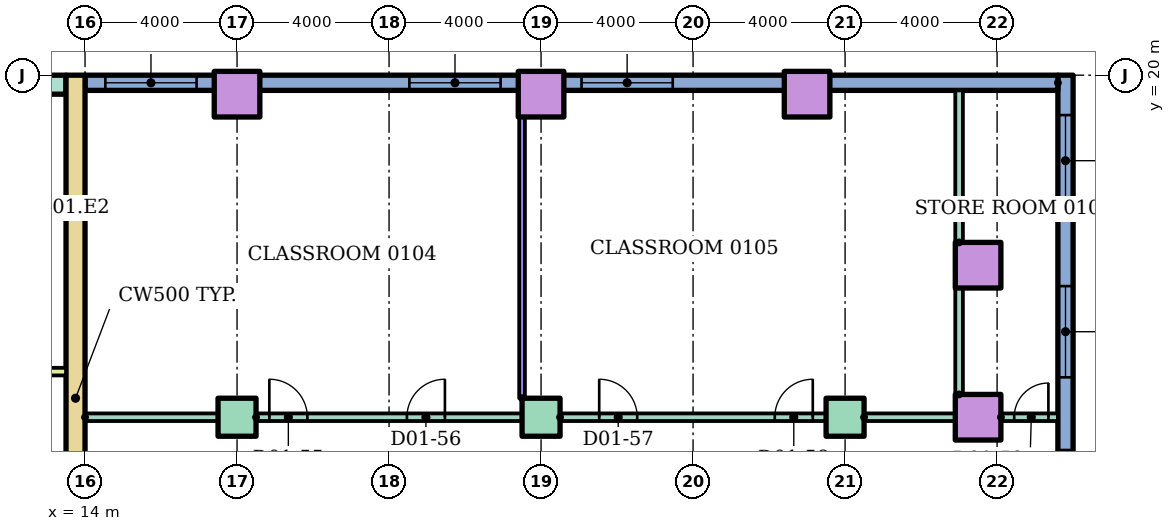
"""IFC4 building model, lengths in metres.
Left out: names, types, materials, properties, quantities, classifications, styles, units other than length and angle.
Written with IfcOpenShell. Run it as: python <this file> out.ifc"""

import sys

from ifc_helpers import new_model, si_unit, direction, frame, frame_2d, origin, origin_2d, place, context, subcontext, project, spatial, rectangle, hollow_rectangle, extrude, element, fill, save


model = new_model("IFC4")
c1 = context("Model", 3, precision=1e-05, world=origin(), true_north=direction((0.0, 1.0)))
c2 = subcontext(c1, "Body", "Model", "MODEL_VIEW")
j1 = project(units=[si_unit("LENGTHUNIT", "METRE"), si_unit("PLANEANGLEUNIT", "RADIAN")], contexts=[c1])
p1 = place(None, origin())
s1 = spatial("IfcSite", under=j1, at=p1, CompositionType="ELEMENT")
p2 = place(p1, origin())
s2 = spatial("IfcBuilding", under=s1, at=p2, CompositionType="ELEMENT")
p3 = place(p2, frame((0.0, 0.0, 6.0)))
s3 = spatial("IfcBuildingStorey", under=s2, at=p3, CompositionType="ELEMENT", Elevation=6.0)
for number, where in (
    (1, (18.0, 11.0, 0.0)),
    (2, (26.0, 11.0, 0.0)),
    (3, (34.0, 11.0, 0.0)),
):
    element("IfcColumn", number, at=place(p3, frame(where)), inside=s3, PredefinedType="COLUMN", context=c2, shape_type="SweptSolid", body=[
        extrude(rectangle(XDim=1.0, YDim=1.0, at=origin_2d()), origin(), (0.0, 0.0, 1.0), 4.0),
    ])
for number, where in (
    (4, (37.5, 11.0, 0.0)),
    (5, (37.5, 15.0, 0.0)),
    (6, (18.0, 19.5, 0.0)),
    (7, (26.0, 19.5, 0.0)),
    (8, (33.0, 19.5, 0.0)),
):
    element("IfcColumn", number, at=place(p3, frame(where)), inside=s3, PredefinedType="COLUMN", context=c2, shape_type="SweptSolid", body=[
        extrude(hollow_rectangle(XDim=1.2, YDim=1.2, WallThickness=0.06, at=origin_2d()), origin(), (0.0, 0.0, 1.0), 4.0),
    ])
p4 = place(p3, frame((39.8, -50.0, 0.0), z_axis=(0.0, 0.0, 1.0), x_axis=(0.0, 1.0, 0.0)))
e9 = element("IfcWall", 9, at=p4, inside=s3, PredefinedType="STANDARD", context=c2, shape_type="SweptSolid", body=[
    extrude(rectangle(XDim=70.0, YDim=0.4, at=frame_2d((35.0, 0.0))), origin(), (0.0, 0.0, 1.0), 3.7),
])
p5 = place(p4, frame((0.75, 0.0, 0.9)))
e10 = element("IfcOpeningElement", 10, at=p5, cuts=e9, PredefinedType="OPENING", context=c2, shape_type="SweptSolid", body=[
    extrude(rectangle(XDim=2.4, YDim=2.1, at=frame_2d((1.2, 1.05))), frame((0.0, 0.21, 0.0), z_axis=(0.0, -1.0, 0.0), x_axis=(1.0, 0.0, 0.0)), (0.0, 0.0, 1.0), 0.42),
])
p6 = place(p4, frame((6.633, 0.0, 0.9)))
e11 = element("IfcOpeningElement", 11, at=p6, cuts=e9, PredefinedType="OPENING", context=c2, shape_type="SweptSolid", body=[
    extrude(rectangle(XDim=2.4, YDim=2.1, at=frame_2d((1.2, 1.05))), frame((0.0, 0.21, 0.0), z_axis=(0.0, -1.0, 0.0), x_axis=(1.0, 0.0, 0.0)), (0.0, 0.0, 1.0), 0.42),
])
p7 = place(p4, frame((10.3, 0.0, 0.9)))
e12 = element("IfcOpeningElement", 12, at=p7, cuts=e9, PredefinedType="OPENING", context=c2, shape_type="SweptSolid", body=[
    extrude(rectangle(XDim=2.4, YDim=2.1, at=frame_2d((1.2, 1.05))), frame((0.0, 0.21, 0.0), z_axis=(0.0, -1.0, 0.0), x_axis=(1.0, 0.0, 0.0)), (0.0, 0.0, 1.0), 0.42),
])
p8 = place(p4, frame((13.967, 0.0, 0.9)))
e13 = element("IfcOpeningElement", 13, at=p8, cuts=e9, PredefinedType="OPENING", context=c2, shape_type="SweptSolid", body=[
    extrude(rectangle(XDim=2.4, YDim=2.1, at=frame_2d((1.2, 1.05))), frame((0.0, 0.21, 0.0), z_axis=(0.0, -1.0, 0.0), x_axis=(1.0, 0.0, 0.0)), (0.0, 0.0, 1.0), 0.42),
])
p9 = place(p4, frame((28.863, 0.0, 0.9)))
e14 = element("IfcOpeningElement", 14, at=p9, cuts=e9, PredefinedType="OPENING", context=c2, shape_type="SweptSolid", body=[
    extrude(rectangle(XDim=2.4, YDim=2.1, at=frame_2d((1.2, 1.05))), frame((0.0, 0.21, 0.0), z_axis=(0.0, -1.0, 0.0), x_axis=(1.0, 0.0, 0.0)), (0.0, 0.0, 1.0), 0.42),
])
p10 = place(p4, frame((32.988, 0.0, 0.9)))
e15 = element("IfcOpeningElement", 15, at=p10, cuts=e9, PredefinedType="OPENING", context=c2, shape_type="SweptSolid", body=[
    extrude(rectangle(XDim=2.4, YDim=2.1, at=frame_2d((1.2, 1.05))), frame((0.0, 0.21, 0.0), z_axis=(0.0, -1.0, 0.0), x_axis=(1.0, 0.0, 0.0)), (0.0, 0.0, 1.0), 0.42),
])
p11 = place(p4, frame((37.113, 0.0, 0.9)))
e16 = element("IfcOpeningElement", 16, at=p11, cuts=e9, PredefinedType="OPENING", context=c2, shape_type="SweptSolid", body=[
    extrude(rectangle(XDim=2.4, YDim=2.1, at=frame_2d((1.2, 1.05))), frame((0.0, 0.21, 0.0), z_axis=(0.0, -1.0, 0.0), x_axis=(1.0, 0.0, 0.0)), (0.0, 0.0, 1.0), 0.42),
])
p12 = place(p4, frame((41.238, 0.0, 0.9)))
e17 = element("IfcOpeningElement", 17, at=p12, cuts=e9, PredefinedType="OPENING", context=c2, shape_type="SweptSolid", body=[
    extrude(rectangle(XDim=2.4, YDim=2.1, at=frame_2d((1.2, 1.05))), frame((0.0, 0.21, 0.0), z_axis=(0.0, -1.0, 0.0), x_axis=(1.0, 0.0, 0.0)), (0.0, 0.0, 1.0), 0.42),
])
p13 = place(p4, frame((45.363, 0.0, 0.9)))
e18 = element("IfcOpeningElement", 18, at=p13, cuts=e9, PredefinedType="OPENING", context=c2, shape_type="SweptSolid", body=[
    extrude(rectangle(XDim=2.4, YDim=2.1, at=frame_2d((1.2, 1.05))), frame((0.0, 0.21, 0.0), z_axis=(0.0, -1.0, 0.0), x_axis=(1.0, 0.0, 0.0)), (0.0, 0.0, 1.0), 0.42),
])
p14 = place(p4, frame((49.488, 0.0, 0.9)))
e19 = element("IfcOpeningElement", 19, at=p14, cuts=e9, PredefinedType="OPENING", context=c2, shape_type="SweptSolid", body=[
    extrude(rectangle(XDim=2.4, YDim=2.1, at=frame_2d((1.2, 1.05))), frame((0.0, 0.21, 0.0), z_axis=(0.0, -1.0, 0.0), x_axis=(1.0, 0.0, 0.0)), (0.0, 0.0, 1.0), 0.42),
])
p15 = place(p4, frame((53.613, 0.0, 0.9)))
e20 = element("IfcOpeningElement", 20, at=p15, cuts=e9, PredefinedType="OPENING", context=c2, shape_type="SweptSolid", body=[
    extrude(rectangle(XDim=2.4, YDim=2.1, at=frame_2d((1.2, 1.05))), frame((0.0, 0.21, 0.0), z_axis=(0.0, -1.0, 0.0), x_axis=(1.0, 0.0, 0.0)), (0.0, 0.0, 1.0), 0.42),
])
p16 = place(p4, frame((57.738, 0.0, 0.9)))
e21 = element("IfcOpeningElement", 21, at=p16, cuts=e9, PredefinedType="OPENING", context=c2, shape_type="SweptSolid", body=[
    extrude(rectangle(XDim=2.4, YDim=2.1, at=frame_2d((1.2, 1.05))), frame((0.0, 0.21, 0.0), z_axis=(0.0, -1.0, 0.0), x_axis=(1.0, 0.0, 0.0)), (0.0, 0.0, 1.0), 0.42),
])
p17 = place(p4, frame((62.05, 0.0, 0.9)))
e22 = element("IfcOpeningElement", 22, at=p17, cuts=e9, PredefinedType="OPENING", context=c2, shape_type="SweptSolid", body=[
    extrude(rectangle(XDim=2.4, YDim=2.1, at=frame_2d((1.2, 1.05))), frame((0.0, 0.21, 0.0), z_axis=(0.0, -1.0, 0.0), x_axis=(1.0, 0.0, 0.0)), (0.0, 0.0, 1.0), 0.42),
])
p18 = place(p4, frame((66.55, 0.0, 0.9)))
e23 = element("IfcOpeningElement", 23, at=p18, cuts=e9, PredefinedType="OPENING", context=c2, shape_type="SweptSolid", body=[
    extrude(rectangle(XDim=2.4, YDim=2.1, at=frame_2d((1.2, 1.05))), frame((0.0, 0.21, 0.0), z_axis=(0.0, -1.0, 0.0), x_axis=(1.0, 0.0, 0.0)), (0.0, 0.0, 1.0), 0.42),
])
p19 = place(p3, frame((39.6, 19.8, 0.0), z_axis=(0.0, 0.0, 1.0), x_axis=(-1.0, 0.0, 0.0)))
e24 = element("IfcWall", 24, at=p19, inside=s3, PredefinedType="STANDARD", context=c2, shape_type="SweptSolid", body=[
    extrude(rectangle(XDim=25.6, YDim=0.4, at=frame_2d((12.8, 0.0))), origin(), (0.0, 0.0, 1.0), 3.7),
])
p20 = place(p19, frame((10.135, 0.0, 0.9)))
e25 = element("IfcOpeningElement", 25, at=p20, cuts=e24, PredefinedType="OPENING", context=c2, shape_type="SweptSolid", body=[
    extrude(rectangle(XDim=2.4, YDim=2.1, at=frame_2d((1.2, 1.05))), frame((0.0, 0.21, 0.0), z_axis=(0.0, -1.0, 0.0), x_axis=(1.0, 0.0, 0.0)), (0.0, 0.0, 1.0), 0.42),
])
p21 = place(p19, frame((14.665, 0.0, 0.9)))
e26 = element("IfcOpeningElement", 26, at=p21, cuts=e24, PredefinedType="OPENING", context=c2, shape_type="SweptSolid", body=[
    extrude(rectangle(XDim=2.4, YDim=2.1, at=frame_2d((1.2, 1.05))), frame((0.0, 0.21, 0.0), z_axis=(0.0, -1.0, 0.0), x_axis=(1.0, 0.0, 0.0)), (0.0, 0.0, 1.0), 0.42),
])
p22 = place(p19, frame((22.665, 0.0, 0.9)))
e27 = element("IfcOpeningElement", 27, at=p22, cuts=e24, PredefinedType="OPENING", context=c2, shape_type="SweptSolid", body=[
    extrude(rectangle(XDim=2.4, YDim=2.1, at=frame_2d((1.2, 1.05))), frame((0.0, 0.21, 0.0), z_axis=(0.0, -1.0, 0.0), x_axis=(1.0, 0.0, 0.0)), (0.0, 0.0, 1.0), 0.42),
])
p23 = place(p3, frame((13.75, 3.0, 0.0), z_axis=(0.0, 0.0, 1.0), x_axis=(0.0, 1.0, 0.0)))
e28 = element("IfcWall", 28, at=p23, inside=s3, PredefinedType="SHEAR", context=c2, shape_type="SweptSolid", body=[
    extrude(rectangle(XDim=17.0, YDim=0.5, at=frame_2d((8.5, 0.0))), origin(), (0.0, 0.0, 1.0), 3.7),
])
p24 = place(p3, frame((-13.5, 19.75, 0.0)))
e29 = element("IfcWall", 29, at=p24, inside=s3, PredefinedType="SHEAR", context=c2, shape_type="SweptSolid", body=[
    extrude(rectangle(XDim=27.0, YDim=0.5, at=frame_2d((13.5, 0.0))), origin(), (0.0, 0.0, 1.0), 3.7),
])
p25 = place(p3, frame((9.6, 12.2, 0.0)))
e30 = element("IfcWall", 30, at=p25, inside=s3, PredefinedType="PARTITIONING", context=c2, shape_type="SweptSolid", body=[
    extrude(rectangle(XDim=3.9, YDim=0.2, at=frame_2d((1.95, 0.0))), origin(), (0.0, 0.0, 1.0), 3.7),
])
p26 = place(p3, frame((14.0, 11.0, 0.0)))
e31 = element("IfcWall", 31, at=p26, inside=s3, PredefinedType="PARTITIONING", context=c2, shape_type="SweptSolid", body=[
    extrude(rectangle(XDim=3.5, YDim=0.2, at=frame_2d((1.75, 0.0))), origin(), (0.0, 0.0, 1.0), 3.7),
])
p27 = place(p3, frame((18.5, 11.0, 0.0)))
e32 = element("IfcWall", 32, at=p27, inside=s3, PredefinedType="PARTITIONING", context=c2, shape_type="SweptSolid", body=[
    extrude(rectangle(XDim=7.0, YDim=0.2, at=frame_2d((3.5, 0.0))), origin(), (0.0, 0.0, 1.0), 3.7),
])
p28 = place(p27, frame((0.35, 0.0, 0.0)))
e33 = element("IfcOpeningElement", 33, at=p28, cuts=e32, PredefinedType="OPENING", context=c2, shape_type="SweptSolid", body=[
    extrude(rectangle(XDim=1.0, YDim=2.1, at=frame_2d((0.5, 1.05))), frame((0.0, 0.11, 0.0), z_axis=(0.0, -1.0, 0.0), x_axis=(1.0, 0.0, 0.0)), (0.0, 0.0, 1.0), 0.22),
])
p29 = place(p27, frame((3.97, 0.0, 0.0)))
e34 = element("IfcOpeningElement", 34, at=p29, cuts=e32, PredefinedType="OPENING", context=c2, shape_type="SweptSolid", body=[
    extrude(rectangle(XDim=1.0, YDim=2.1, at=frame_2d((0.5, 1.05))), frame((0.0, 0.11, 0.0), z_axis=(0.0, -1.0, 0.0), x_axis=(1.0, 0.0, 0.0)), (0.0, 0.0, 1.0), 0.22),
])
p30 = place(p3, frame((26.5, 11.0, 0.0)))
e35 = element("IfcWall", 35, at=p30, inside=s3, PredefinedType="PARTITIONING", context=c2, shape_type="SweptSolid", body=[
    extrude(rectangle(XDim=7.0, YDim=0.2, at=frame_2d((3.5, 0.0))), origin(), (0.0, 0.0, 1.0), 3.7),
])
p31 = place(p30, frame((1.03, 0.0, 0.0)))
e36 = element("IfcOpeningElement", 36, at=p31, cuts=e35, PredefinedType="OPENING", context=c2, shape_type="SweptSolid", body=[
    extrude(rectangle(XDim=1.0, YDim=2.1, at=frame_2d((0.5, 1.05))), frame((0.0, 0.11, 0.0), z_axis=(0.0, -1.0, 0.0), x_axis=(1.0, 0.0, 0.0)), (0.0, 0.0, 1.0), 0.22),
])
p32 = place(p30, frame((5.65, 0.0, 0.0)))
e37 = element("IfcOpeningElement", 37, at=p32, cuts=e35, PredefinedType="OPENING", context=c2, shape_type="SweptSolid", body=[
    extrude(rectangle(XDim=1.0, YDim=2.1, at=frame_2d((0.5, 1.05))), frame((0.0, 0.11, 0.0), z_axis=(0.0, -1.0, 0.0), x_axis=(1.0, 0.0, 0.0)), (0.0, 0.0, 1.0), 0.22),
])
p33 = place(p3, frame((34.5, 11.0, 0.0)))
e38 = element("IfcWall", 38, at=p33, inside=s3, PredefinedType="PARTITIONING", context=c2, shape_type="SweptSolid", body=[
    extrude(rectangle(XDim=2.4, YDim=0.2, at=frame_2d((1.2, 0.0))), origin(), (0.0, 0.0, 1.0), 3.7),
])
p34 = place(p3, frame((38.1, 11.0, 0.0)))
e39 = element("IfcWall", 39, at=p34, inside=s3, PredefinedType="PARTITIONING", context=c2, shape_type="SweptSolid", body=[
    extrude(rectangle(XDim=1.5, YDim=0.2, at=frame_2d((0.75, 0.0))), origin(), (0.0, 0.0, 1.0), 3.7),
])
p35 = place(p34, frame((0.35, 0.0, 0.0)))
e40 = element("IfcOpeningElement", 40, at=p35, cuts=e39, PredefinedType="OPENING", context=c2, shape_type="SweptSolid", body=[
    extrude(rectangle(XDim=0.9, YDim=2.1, at=frame_2d((0.45, 1.05))), frame((0.0, 0.11, 0.0), z_axis=(0.0, -1.0, 0.0), x_axis=(1.0, 0.0, 0.0)), (0.0, 0.0, 1.0), 0.22),
])
p36 = place(p3, frame((25.5, 11.5, 0.0), z_axis=(0.0, 0.0, 1.0), x_axis=(0.0, 1.0, 0.0)))
e41 = element("IfcWall", 41, at=p36, inside=s3, PredefinedType="PARTITIONING", context=c2, shape_type="SweptSolid", body=[
    extrude(rectangle(XDim=7.4, YDim=0.15, at=frame_2d((3.7, 0.0))), origin(), (0.0, 0.0, 1.0), 3.7),
])
p37 = place(p3, frame((37.0, 11.6, 0.0), z_axis=(0.0, 0.0, 1.0), x_axis=(0.0, 1.0, 0.0)))
e42 = element("IfcWall", 42, at=p37, inside=s3, PredefinedType="PARTITIONING", context=c2, shape_type="SweptSolid", body=[
    extrude(rectangle(XDim=2.8, YDim=0.2, at=frame_2d((1.4, 0.0))), origin(), (0.0, 0.0, 1.0), 3.7),
])
p38 = place(p3, frame((37.0, 15.6, 0.0), z_axis=(0.0, 0.0, 1.0), x_axis=(0.0, 1.0, 0.0)))
e43 = element("IfcWall", 43, at=p38, inside=s3, PredefinedType="PARTITIONING", context=c2, shape_type="SweptSolid", body=[
    extrude(rectangle(XDim=4.0, YDim=0.2, at=frame_2d((2.0, 0.0))), origin(), (0.0, 0.0, 1.0), 3.7),
])
p39 = place(p16, origin())
e44 = element("IfcWindow", 44, at=p39, inside=s3, PartitioningType="SINGLE_PANEL", PredefinedType="WINDOW", context=c2, shape_type="SweptSolid", body=[
    extrude(rectangle(XDim=2.4, YDim=2.1, at=frame_2d((1.2, 1.05))), frame((0.0, 0.03, 0.0), z_axis=(0.0, -1.0, 0.0), x_axis=(1.0, 0.0, 0.0)), (0.0, 0.0, 1.0), 0.06),
])
fill(e21, e44)
p40 = place(p17, origin())
e45 = element("IfcWindow", 45, at=p40, inside=s3, PartitioningType="SINGLE_PANEL", PredefinedType="WINDOW", context=c2, shape_type="SweptSolid", body=[
    extrude(rectangle(XDim=2.4, YDim=2.1, at=frame_2d((1.2, 1.05))), frame((0.0, 0.03, 0.0), z_axis=(0.0, -1.0, 0.0), x_axis=(1.0, 0.0, 0.0)), (0.0, 0.0, 1.0), 0.06),
])
fill(e22, e45)
p41 = place(p18, origin())
e46 = element("IfcWindow", 46, at=p41, inside=s3, PartitioningType="SINGLE_PANEL", PredefinedType="WINDOW", context=c2, shape_type="SweptSolid", body=[
    extrude(rectangle(XDim=2.4, YDim=2.1, at=frame_2d((1.2, 1.05))), frame((0.0, 0.03, 0.0), z_axis=(0.0, -1.0, 0.0), x_axis=(1.0, 0.0, 0.0)), (0.0, 0.0, 1.0), 0.06),
])
fill(e23, e46)
p42 = place(p20, origin())
e47 = element("IfcWindow", 47, at=p42, inside=s3, PartitioningType="SINGLE_PANEL", PredefinedType="WINDOW", context=c2, shape_type="SweptSolid", body=[
    extrude(rectangle(XDim=2.4, YDim=2.1, at=frame_2d((1.2, 1.05))), frame((0.0, 0.03, 0.0), z_axis=(0.0, -1.0, 0.0), x_axis=(1.0, 0.0, 0.0)), (0.0, 0.0, 1.0), 0.06),
])
fill(e25, e47)
p43 = place(p21, origin())
e48 = element("IfcWindow", 48, at=p43, inside=s3, PartitioningType="SINGLE_PANEL", PredefinedType="WINDOW", context=c2, shape_type="SweptSolid", body=[
    extrude(rectangle(XDim=2.4, YDim=2.1, at=frame_2d((1.2, 1.05))), frame((0.0, 0.03, 0.0), z_axis=(0.0, -1.0, 0.0), x_axis=(1.0, 0.0, 0.0)), (0.0, 0.0, 1.0), 0.06),
])
fill(e26, e48)
p44 = place(p22, origin())
e49 = element("IfcWindow", 49, at=p44, inside=s3, PartitioningType="SINGLE_PANEL", PredefinedType="WINDOW", context=c2, shape_type="SweptSolid", body=[
    extrude(rectangle(XDim=2.4, YDim=2.1, at=frame_2d((1.2, 1.05))), frame((0.0, 0.03, 0.0), z_axis=(0.0, -1.0, 0.0), x_axis=(1.0, 0.0, 0.0)), (0.0, 0.0, 1.0), 0.06),
])
fill(e27, e49)
p45 = place(p28, origin())
e50 = element("IfcDoor", 50, at=p45, inside=s3, OperationType="SINGLE_SWING_LEFT", PredefinedType="DOOR", context=c2, shape_type="SweptSolid", body=[
    extrude(rectangle(XDim=1.0, YDim=2.1, at=frame_2d((0.5, 1.05))), frame((0.0, 0.025, 0.0), z_axis=(0.0, -1.0, 0.0), x_axis=(1.0, 0.0, 0.0)), (0.0, 0.0, 1.0), 0.05),
])
fill(e33, e50)
p46 = place(p29, origin())
e51 = element("IfcDoor", 51, at=p46, inside=s3, OperationType="SINGLE_SWING_RIGHT", PredefinedType="DOOR", context=c2, shape_type="SweptSolid", body=[
    extrude(rectangle(XDim=1.0, YDim=2.1, at=frame_2d((0.5, 1.05))), frame((0.0, 0.025, 0.0), z_axis=(0.0, -1.0, 0.0), x_axis=(1.0, 0.0, 0.0)), (0.0, 0.0, 1.0), 0.05),
])
fill(e34, e51)
p47 = place(p31, origin())
e52 = element("IfcDoor", 52, at=p47, inside=s3, OperationType="SINGLE_SWING_LEFT", PredefinedType="DOOR", context=c2, shape_type="SweptSolid", body=[
    extrude(rectangle(XDim=1.0, YDim=2.1, at=frame_2d((0.5, 1.05))), frame((0.0, 0.025, 0.0), z_axis=(0.0, -1.0, 0.0), x_axis=(1.0, 0.0, 0.0)), (0.0, 0.0, 1.0), 0.05),
])
fill(e36, e52)
p48 = place(p32, origin())
e53 = element("IfcDoor", 53, at=p48, inside=s3, OperationType="SINGLE_SWING_RIGHT", PredefinedType="DOOR", context=c2, shape_type="SweptSolid", body=[
    extrude(rectangle(XDim=1.0, YDim=2.1, at=frame_2d((0.5, 1.05))), frame((0.0, 0.025, 0.0), z_axis=(0.0, -1.0, 0.0), x_axis=(1.0, 0.0, 0.0)), (0.0, 0.0, 1.0), 0.05),
])
fill(e37, e53)
p49 = place(p35, origin())
e54 = element("IfcDoor", 54, at=p49, inside=s3, OperationType="SINGLE_SWING_RIGHT", PredefinedType="DOOR", context=c2, shape_type="SweptSolid", body=[
    extrude(rectangle(XDim=0.9, YDim=2.1, at=frame_2d((0.45, 1.05))), frame((0.0, 0.025, 0.0), z_axis=(0.0, -1.0, 0.0), x_axis=(1.0, 0.0, 0.0)), (0.0, 0.0, 1.0), 0.05),
])
fill(e40, e54)
save(model, sys.argv[1])
